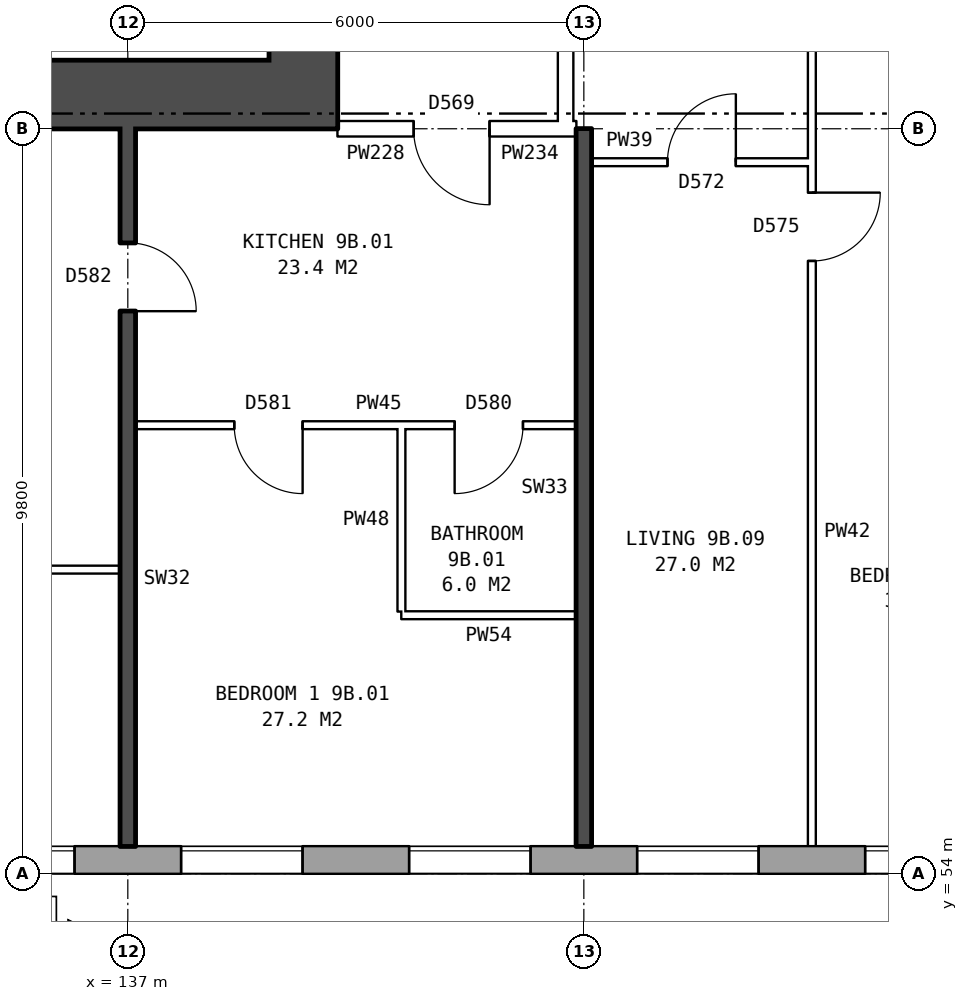
"""IFC4 building model, lengths in metres.
Left out: names, types, materials, properties, quantities, classifications, styles, units other than length and angle.
Written with IfcOpenShell. Run it as: python <this file> out.ifc"""

import sys

from ifc_helpers import new_model, si_unit, direction, frame, frame_2d, origin, place, context, subcontext, project, spatial, rectangle, extrude, element, fill, save


model = new_model("IFC4")
c1 = context("Model", 3, precision=1e-05, world=origin(), true_north=direction((0.0, 1.0)))
c2 = subcontext(c1, "Body", "Model", "MODEL_VIEW")
j1 = project(units=[si_unit("LENGTHUNIT", "METRE"), si_unit("PLANEANGLEUNIT", "RADIAN")], contexts=[c1])
p1 = place(None, origin())
s1 = spatial("IfcSite", under=j1, at=p1, CompositionType="ELEMENT")
p2 = place(p1, origin())
s2 = spatial("IfcBuilding", under=s1, at=p2, CompositionType="ELEMENT")
p3 = place(p2, frame((0.0, 0.0, 35.0)))
s3 = spatial("IfcBuildingStorey", under=s2, at=p3, CompositionType="ELEMENT", Elevation=35.0)
p4 = place(p3, frame((134.075, 54.18, 0.0), z_axis=(0.0, 0.0, 1.0), x_axis=(1.0, 0.0, 0.0)))
e1 = element("IfcWall", 1, at=p4, inside=s3, PredefinedType="STANDARD", context=c2, shape_type="SweptSolid", body=[
    extrude(rectangle(XDim=40.601, YDim=0.36, at=frame_2d((20.3, 0.0))), origin(), (0.0, 0.0, 1.0), 2.85),
])
p5 = place(p4, frame((0.625, 0.0, 0.8)))
e2 = element("IfcOpeningElement", 2, at=p5, cuts=e1, PredefinedType="OPENING", context=c2, shape_type="SweptSolid", body=[
    extrude(rectangle(XDim=1.6, YDim=1.8, at=frame_2d((0.8, 0.9))), frame((0.0, 0.19, 0.0), z_axis=(0.0, -1.0, 0.0), x_axis=(1.0, 0.0, 0.0)), (0.0, 0.0, 1.0), 0.38),
])
p6 = place(p4, frame((3.625, 0.0, 0.8)))
e3 = element("IfcOpeningElement", 3, at=p6, cuts=e1, PredefinedType="OPENING", context=c2, shape_type="SweptSolid", body=[
    extrude(rectangle(XDim=1.6, YDim=1.8, at=frame_2d((0.8, 0.9))), frame((0.0, 0.19, 0.0), z_axis=(0.0, -1.0, 0.0), x_axis=(1.0, 0.0, 0.0)), (0.0, 0.0, 1.0), 0.38),
])
p7 = place(p4, frame((6.625, 0.0, 0.8)))
e4 = element("IfcOpeningElement", 4, at=p7, cuts=e1, PredefinedType="OPENING", context=c2, shape_type="SweptSolid", body=[
    extrude(rectangle(XDim=1.6, YDim=1.8, at=frame_2d((0.8, 0.9))), frame((0.0, 0.19, 0.0), z_axis=(0.0, -1.0, 0.0), x_axis=(1.0, 0.0, 0.0)), (0.0, 0.0, 1.0), 0.38),
])
p8 = place(p4, frame((9.625, 0.0, 0.8)))
e5 = element("IfcOpeningElement", 5, at=p8, cuts=e1, PredefinedType="OPENING", context=c2, shape_type="SweptSolid", body=[
    extrude(rectangle(XDim=1.6, YDim=1.8, at=frame_2d((0.8, 0.9))), frame((0.0, 0.19, 0.0), z_axis=(0.0, -1.0, 0.0), x_axis=(1.0, 0.0, 0.0)), (0.0, 0.0, 1.0), 0.38),
])
p9 = place(p4, frame((12.625, 0.0, 0.8)))
e6 = element("IfcOpeningElement", 6, at=p9, cuts=e1, PredefinedType="OPENING", context=c2, shape_type="SweptSolid", body=[
    extrude(rectangle(XDim=1.6, YDim=1.8, at=frame_2d((0.8, 0.9))), frame((0.0, 0.19, 0.0), z_axis=(0.0, -1.0, 0.0), x_axis=(1.0, 0.0, 0.0)), (0.0, 0.0, 1.0), 0.38),
])
p10 = place(p4, frame((15.625, 0.0, 0.8)))
e7 = element("IfcOpeningElement", 7, at=p10, cuts=e1, PredefinedType="OPENING", context=c2, shape_type="SweptSolid", body=[
    extrude(rectangle(XDim=1.6, YDim=1.8, at=frame_2d((0.8, 0.9))), frame((0.0, 0.19, 0.0), z_axis=(0.0, -1.0, 0.0), x_axis=(1.0, 0.0, 0.0)), (0.0, 0.0, 1.0), 0.38),
])
p11 = place(p4, frame((18.875, 0.0, 0.15)))
e8 = element("IfcOpeningElement", 8, at=p11, cuts=e1, PredefinedType="OPENING", context=c2, shape_type="SweptSolid", body=[
    extrude(rectangle(XDim=0.8, YDim=0.9, at=frame_2d((0.4, 0.45))), frame((0.0, 0.19, 0.0), z_axis=(0.0, -1.0, 0.0), x_axis=(1.0, 0.0, 0.0)), (0.0, 0.0, 1.0), 0.38),
])
p12 = place(p4, frame((22.175, 0.0, 1.7)))
e9 = element("IfcOpeningElement", 9, at=p12, cuts=e1, PredefinedType="OPENING", context=c2, shape_type="SweptSolid", body=[
    extrude(rectangle(XDim=0.8, YDim=0.9, at=frame_2d((0.4, 0.45))), frame((0.0, 0.19, 0.0), z_axis=(0.0, -1.0, 0.0), x_axis=(1.0, 0.0, 0.0)), (0.0, 0.0, 1.0), 0.38),
])
p13 = place(p4, frame((24.625, 0.0, 0.8)))
e10 = element("IfcOpeningElement", 10, at=p13, cuts=e1, PredefinedType="OPENING", context=c2, shape_type="SweptSolid", body=[
    extrude(rectangle(XDim=1.6, YDim=1.8, at=frame_2d((0.8, 0.9))), frame((0.0, 0.19, 0.0), z_axis=(0.0, -1.0, 0.0), x_axis=(1.0, 0.0, 0.0)), (0.0, 0.0, 1.0), 0.38),
])
p14 = place(p4, frame((27.625, 0.0, 0.8)))
e11 = element("IfcOpeningElement", 11, at=p14, cuts=e1, PredefinedType="OPENING", context=c2, shape_type="SweptSolid", body=[
    extrude(rectangle(XDim=1.6, YDim=1.8, at=frame_2d((0.8, 0.9))), frame((0.0, 0.19, 0.0), z_axis=(0.0, -1.0, 0.0), x_axis=(1.0, 0.0, 0.0)), (0.0, 0.0, 1.0), 0.38),
])
p15 = place(p4, frame((30.625, 0.0, 0.8)))
e12 = element("IfcOpeningElement", 12, at=p15, cuts=e1, PredefinedType="OPENING", context=c2, shape_type="SweptSolid", body=[
    extrude(rectangle(XDim=1.6, YDim=1.8, at=frame_2d((0.8, 0.9))), frame((0.0, 0.19, 0.0), z_axis=(0.0, -1.0, 0.0), x_axis=(1.0, 0.0, 0.0)), (0.0, 0.0, 1.0), 0.38),
])
p16 = place(p4, frame((33.625, 0.0, 0.8)))
e13 = element("IfcOpeningElement", 13, at=p16, cuts=e1, PredefinedType="OPENING", context=c2, shape_type="SweptSolid", body=[
    extrude(rectangle(XDim=1.6, YDim=1.8, at=frame_2d((0.8, 0.9))), frame((0.0, 0.19, 0.0), z_axis=(0.0, -1.0, 0.0), x_axis=(1.0, 0.0, 0.0)), (0.0, 0.0, 1.0), 0.38),
])
p17 = place(p4, frame((36.625, 0.0, 0.8)))
e14 = element("IfcOpeningElement", 14, at=p17, cuts=e1, PredefinedType="OPENING", context=c2, shape_type="SweptSolid", body=[
    extrude(rectangle(XDim=1.6, YDim=1.8, at=frame_2d((0.8, 0.9))), frame((0.0, 0.19, 0.0), z_axis=(0.0, -1.0, 0.0), x_axis=(1.0, 0.0, 0.0)), (0.0, 0.0, 1.0), 0.38),
])
p18 = place(p4, frame((19.975, 0.0, 0.15)))
e15 = element("IfcOpeningElement", 15, at=p18, cuts=e1, PredefinedType="OPENING", context=c2, shape_type="SweptSolid", body=[
    extrude(rectangle(XDim=0.6, YDim=1.8, at=frame_2d((0.3, 0.9))), frame((0.0, 0.19, 0.0), z_axis=(0.0, -1.0, 0.0), x_axis=(1.0, 0.0, 0.0)), (0.0, 0.0, 1.0), 0.38),
])
p19 = place(p4, frame((23.325, 0.0, 0.8)))
e16 = element("IfcOpeningElement", 16, at=p19, cuts=e1, PredefinedType="OPENING", context=c2, shape_type="SweptSolid", body=[
    extrude(rectangle(XDim=1.0, YDim=1.8, at=frame_2d((0.5, 0.9))), frame((0.0, 0.19, 0.0), z_axis=(0.0, -1.0, 0.0), x_axis=(1.0, 0.0, 0.0)), (0.0, 0.0, 1.0), 0.38),
])
p20 = place(p3, frame((139.31, 64.7, 0.0), z_axis=(0.0, 0.0, 1.0), x_axis=(0.0, 1.0, 0.0)))
e17 = element("IfcWall", 17, at=p20, inside=s3, PredefinedType="SHEAR", context=c2, shape_type="SweptSolid", body=[
    extrude(rectangle(XDim=10.6, YDim=0.9, at=frame_2d((5.3, 0.0))), origin(), (0.0, 0.0, 1.0), 2.85),
])
p21 = place(p20, frame((0.425, 0.0, 0.0)))
e18 = element("IfcOpeningElement", 18, at=p21, cuts=e17, PredefinedType="OPENING", context=c2, shape_type="SweptSolid", body=[
    extrude(rectangle(XDim=1.1, YDim=2.1, at=frame_2d((0.55, 1.05))), frame((0.0, 0.46, 0.0), z_axis=(0.0, -1.0, 0.0), x_axis=(1.0, 0.0, 0.0)), (0.0, 0.0, 1.0), 0.92),
])
p22 = place(p20, frame((9.0, 0.0, 0.0)))
e19 = element("IfcOpeningElement", 19, at=p22, cuts=e17, PredefinedType="OPENING", context=c2, shape_type="SweptSolid", body=[
    extrude(rectangle(XDim=1.1, YDim=2.1, at=frame_2d((0.55, 1.05))), frame((0.0, 0.46, 0.0), z_axis=(0.0, -1.0, 0.0), x_axis=(1.0, 0.0, 0.0)), (0.0, 0.0, 1.0), 0.92),
])
p23 = place(p20, frame((7.225, 0.0, 0.0)))
e20 = element("IfcOpeningElement", 20, at=p23, cuts=e17, PredefinedType="OPENING", context=c2, shape_type="SweptSolid", body=[
    extrude(rectangle(XDim=0.85, YDim=2.1, at=frame_2d((0.425, 1.05))), frame((0.0, 0.46, 0.0), z_axis=(0.0, -1.0, 0.0), x_axis=(1.0, 0.0, 0.0)), (0.0, 0.0, 1.0), 0.92),
])
p24 = place(p3, frame((139.76, 64.25, 0.0), z_axis=(0.0, 0.0, 1.0), x_axis=(-1.0, 0.0, 0.0)))
e21 = element("IfcWall", 21, at=p24, inside=s3, PredefinedType="SHEAR", context=c2, shape_type="SweptSolid", body=[
    extrude(rectangle(XDim=8.4, YDim=0.9, at=frame_2d((4.2, 0.0))), origin(), (0.0, 0.0, 1.0), 2.85),
])
p25 = place(p3, frame((142.76, 63.9, 0.0), z_axis=(0.0, 0.0, 1.0), x_axis=(0.0, 1.0, 0.0)))
e22 = element("IfcWall", 22, at=p25, inside=s3, PredefinedType="PARTITIONING", context=c2, shape_type="SweptSolid", body=[
    extrude(rectangle(XDim=12.2, YDim=0.2, at=frame_2d((6.1, 0.0))), origin(), (0.0, 0.0, 1.0), 2.85),
])
p26 = place(p25, frame((5.1, 0.0, 0.0)))
e23 = element("IfcOpeningElement", 23, at=p26, cuts=e22, PredefinedType="OPENING", context=c2, shape_type="SweptSolid", body=[
    extrude(rectangle(XDim=2.0, YDim=2.1, at=frame_2d((1.0, 1.05))), frame((0.0, 0.11, 0.0), z_axis=(0.0, -1.0, 0.0), x_axis=(1.0, 0.0, 0.0)), (0.0, 0.0, 1.0), 0.22),
])
p27 = place(p3, frame((140.6, 57.4, 0.0), z_axis=(0.0, 0.0, 1.0), x_axis=(1.0, 0.0, 0.0)))
e24 = element("IfcWall", 24, at=p27, inside=s3, PredefinedType="PARTITIONING", context=c2, shape_type="SweptSolid", body=[
    extrude(rectangle(XDim=2.3, YDim=0.1, at=frame_2d((1.15, 0.0))), origin(), (0.0, 0.0, 1.0), 2.85),
])
p28 = place(p3, frame((131.36, 58.0, 0.0), z_axis=(0.0, 0.0, 1.0), x_axis=(1.0, 0.0, 0.0)))
e25 = element("IfcWall", 25, at=p28, inside=s3, PredefinedType="PARTITIONING", context=c2, shape_type="SweptSolid", body=[
    extrude(rectangle(XDim=5.54, YDim=0.1, at=frame_2d((2.77, 0.0))), origin(), (0.0, 0.0, 1.0), 2.85),
])
p29 = place(p28, frame((2.32, 0.0, 0.0)))
e26 = element("IfcOpeningElement", 26, at=p29, cuts=e25, PredefinedType="OPENING", context=c2, shape_type="SweptSolid", body=[
    extrude(rectangle(XDim=0.9, YDim=2.1, at=frame_2d((0.45, 1.05))), frame((0.0, 0.06, 0.0), z_axis=(0.0, -1.0, 0.0), x_axis=(1.0, 0.0, 0.0)), (0.0, 0.0, 1.0), 0.12),
])
p30 = place(p3, frame((137.1, 59.9, 0.0), z_axis=(0.0, 0.0, 1.0), x_axis=(1.0, 0.0, 0.0)))
e27 = element("IfcWall", 27, at=p30, inside=s3, PredefinedType="PARTITIONING", context=c2, shape_type="SweptSolid", body=[
    extrude(rectangle(XDim=5.8, YDim=0.1, at=frame_2d((2.9, 0.0))), origin(), (0.0, 0.0, 1.0), 2.85),
])
p31 = place(p30, frame((1.3, 0.0, 0.0)))
e28 = element("IfcOpeningElement", 28, at=p31, cuts=e27, PredefinedType="OPENING", context=c2, shape_type="SweptSolid", body=[
    extrude(rectangle(XDim=0.9, YDim=2.1, at=frame_2d((0.45, 1.05))), frame((0.0, 0.06, 0.0), z_axis=(0.0, -1.0, 0.0), x_axis=(1.0, 0.0, 0.0)), (0.0, 0.0, 1.0), 0.12),
])
p32 = place(p30, frame((4.2, 0.0, 0.0)))
e29 = element("IfcOpeningElement", 29, at=p32, cuts=e27, PredefinedType="OPENING", context=c2, shape_type="SweptSolid", body=[
    extrude(rectangle(XDim=0.9, YDim=2.1, at=frame_2d((0.45, 1.05))), frame((0.0, 0.06, 0.0), z_axis=(0.0, -1.0, 0.0), x_axis=(1.0, 0.0, 0.0)), (0.0, 0.0, 1.0), 0.12),
])
p33 = place(p3, frame((143.1, 63.36, 0.0), z_axis=(0.0, 0.0, 1.0), x_axis=(1.0, 0.0, 0.0)))
e30 = element("IfcWall", 30, at=p33, inside=s3, PredefinedType="PARTITIONING", context=c2, shape_type="SweptSolid", body=[
    extrude(rectangle(XDim=2.9, YDim=0.1, at=frame_2d((1.45, 0.0))), origin(), (0.0, 0.0, 1.0), 2.85),
])
p34 = place(p33, frame((1.0, 0.0, 0.0)))
e31 = element("IfcOpeningElement", 31, at=p34, cuts=e30, PredefinedType="OPENING", context=c2, shape_type="SweptSolid", body=[
    extrude(rectangle(XDim=0.9, YDim=2.1, at=frame_2d((0.45, 1.05))), frame((0.0, 0.06, 0.0), z_axis=(0.0, -1.0, 0.0), x_axis=(1.0, 0.0, 0.0)), (0.0, 0.0, 1.0), 0.12),
])
p35 = place(p3, frame((139.76, 63.8, 0.0), z_axis=(0.0, 0.0, 1.0), x_axis=(1.0, 0.0, 0.0)))
e32 = element("IfcWall", 32, at=p35, inside=s3, PredefinedType="PARTITIONING", context=c2, shape_type="SweptSolid", body=[
    extrude(rectangle(XDim=3.0, YDim=0.2, at=frame_2d((1.5, 0.0))), origin(), (0.0, 0.0, 1.0), 2.85),
])
p36 = place(p35, frame((1.0, 0.0, 0.0)))
e33 = element("IfcOpeningElement", 33, at=p36, cuts=e32, PredefinedType="OPENING", context=c2, shape_type="SweptSolid", body=[
    extrude(rectangle(XDim=1.0, YDim=2.1, at=frame_2d((0.5, 1.05))), frame((0.0, 0.11, 0.0), z_axis=(0.0, -1.0, 0.0), x_axis=(1.0, 0.0, 0.0)), (0.0, 0.0, 1.0), 0.22),
])
p37 = place(p3, frame((142.76, 63.8, 0.0), z_axis=(0.0, 0.0, 1.0), x_axis=(1.0, 0.0, 0.0)))
e34 = element("IfcWall", 34, at=p37, inside=s3, PredefinedType="PARTITIONING", context=c2, shape_type="SweptSolid", body=[
    extrude(rectangle(XDim=0.14, YDim=0.2, at=frame_2d((0.07, 0.0))), origin(), (0.0, 0.0, 1.0), 2.85),
])
p38 = place(p3, frame((137.0, 54.36, 0.0), z_axis=(0.0, 0.0, 1.0), x_axis=(0.0, 1.0, 0.0)))
e35 = element("IfcWall", 35, at=p38, inside=s3, PredefinedType="SOLIDWALL", context=c2, shape_type="SweptSolid", body=[
    extrude(rectangle(XDim=9.44, YDim=0.2, at=frame_2d((4.72, 0.0))), origin(), (0.0, 0.0, 1.0), 2.85),
])
p39 = place(p38, frame((7.04, 0.0, 0.0)))
e36 = element("IfcOpeningElement", 36, at=p39, cuts=e35, PredefinedType="OPENING", context=c2, shape_type="SweptSolid", body=[
    extrude(rectangle(XDim=0.9, YDim=2.1, at=frame_2d((0.45, 1.05))), frame((0.0, 0.11, 0.0), z_axis=(0.0, -1.0, 0.0), x_axis=(1.0, 0.0, 0.0)), (0.0, 0.0, 1.0), 0.22),
])
p40 = place(p3, frame((140.6, 57.45, 0.0), z_axis=(0.0, 0.0, 1.0), x_axis=(0.0, 1.0, 0.0)))
e37 = element("IfcWall", 37, at=p40, inside=s3, PredefinedType="PARTITIONING", context=c2, shape_type="SweptSolid", body=[
    extrude(rectangle(XDim=2.4, YDim=0.1, at=frame_2d((1.2, 0.0))), origin(), (0.0, 0.0, 1.0), 2.85),
])
p41 = place(p3, frame((143.0, 54.36, 0.0), z_axis=(0.0, 0.0, 1.0), x_axis=(0.0, 1.0, 0.0)))
e38 = element("IfcWall", 38, at=p41, inside=s3, PredefinedType="SOLIDWALL", context=c2, shape_type="SweptSolid", body=[
    extrude(rectangle(XDim=9.44, YDim=0.2, at=frame_2d((4.72, 0.0))), origin(), (0.0, 0.0, 1.0), 2.85),
])
p42 = place(p3, frame((146.0, 54.36, 0.0), z_axis=(0.0, 0.0, 1.0), x_axis=(0.0, 1.0, 0.0)))
e39 = element("IfcWall", 39, at=p42, inside=s3, PredefinedType="PARTITIONING", context=c2, shape_type="SweptSolid", body=[
    extrude(rectangle(XDim=14.34, YDim=0.1, at=frame_2d((7.17, 0.0))), origin(), (0.0, 0.0, 1.0), 2.85),
])
p43 = place(p42, frame((7.7, 0.0, 0.0)))
e40 = element("IfcOpeningElement", 40, at=p43, cuts=e39, PredefinedType="OPENING", context=c2, shape_type="SweptSolid", body=[
    extrude(rectangle(XDim=0.9, YDim=2.1, at=frame_2d((0.45, 1.05))), frame((0.0, 0.06, 0.0), z_axis=(0.0, -1.0, 0.0), x_axis=(1.0, 0.0, 0.0)), (0.0, 0.0, 1.0), 0.12),
])
p44 = place(p42, frame((13.04, 0.0, 0.0)))
e41 = element("IfcOpeningElement", 41, at=p44, cuts=e39, PredefinedType="OPENING", context=c2, shape_type="SweptSolid", body=[
    extrude(rectangle(XDim=0.9, YDim=2.1, at=frame_2d((0.45, 1.05))), frame((0.0, 0.06, 0.0), z_axis=(0.0, -1.0, 0.0), x_axis=(1.0, 0.0, 0.0)), (0.0, 0.0, 1.0), 0.12),
])
p45 = place(p5, origin())
e42 = element("IfcWindow", 42, at=p45, inside=s3, PartitioningType="SINGLE_PANEL", PredefinedType="WINDOW", context=c2, shape_type="SweptSolid", body=[
    extrude(rectangle(XDim=1.6, YDim=1.8, at=frame_2d((0.8, 0.9))), frame((0.0, 0.15, 0.0), z_axis=(0.0, -1.0, 0.0), x_axis=(1.0, 0.0, 0.0)), (0.0, 0.0, 1.0), 0.06),
])
fill(e2, e42)
p46 = place(p6, origin())
e43 = element("IfcWindow", 43, at=p46, inside=s3, PartitioningType="SINGLE_PANEL", PredefinedType="WINDOW", context=c2, shape_type="SweptSolid", body=[
    extrude(rectangle(XDim=1.6, YDim=1.8, at=frame_2d((0.8, 0.9))), frame((0.0, 0.15, 0.0), z_axis=(0.0, -1.0, 0.0), x_axis=(1.0, 0.0, 0.0)), (0.0, 0.0, 1.0), 0.06),
])
fill(e3, e43)
p47 = place(p7, origin())
e44 = element("IfcWindow", 44, at=p47, inside=s3, PartitioningType="SINGLE_PANEL", PredefinedType="WINDOW", context=c2, shape_type="SweptSolid", body=[
    extrude(rectangle(XDim=1.6, YDim=1.8, at=frame_2d((0.8, 0.9))), frame((0.0, 0.15, 0.0), z_axis=(0.0, -1.0, 0.0), x_axis=(1.0, 0.0, 0.0)), (0.0, 0.0, 1.0), 0.06),
])
fill(e4, e44)
p48 = place(p8, origin())
e45 = element("IfcWindow", 45, at=p48, inside=s3, PartitioningType="SINGLE_PANEL", PredefinedType="WINDOW", context=c2, shape_type="SweptSolid", body=[
    extrude(rectangle(XDim=1.6, YDim=1.8, at=frame_2d((0.8, 0.9))), frame((0.0, 0.15, 0.0), z_axis=(0.0, -1.0, 0.0), x_axis=(1.0, 0.0, 0.0)), (0.0, 0.0, 1.0), 0.06),
])
fill(e5, e45)
p49 = place(p9, origin())
e46 = element("IfcWindow", 46, at=p49, inside=s3, PartitioningType="SINGLE_PANEL", PredefinedType="WINDOW", context=c2, shape_type="SweptSolid", body=[
    extrude(rectangle(XDim=1.6, YDim=1.8, at=frame_2d((0.8, 0.9))), frame((0.0, 0.15, 0.0), z_axis=(0.0, -1.0, 0.0), x_axis=(1.0, 0.0, 0.0)), (0.0, 0.0, 1.0), 0.06),
])
fill(e6, e46)
p50 = place(p31, frame((0.9, 0.0, 0.0), z_axis=(0.0, 0.0, 1.0), x_axis=(-1.0, 0.0, 0.0)))
e47 = element("IfcDoor", 47, at=p50, inside=s3, OperationType="SINGLE_SWING_LEFT", PredefinedType="DOOR", context=c2, shape_type="SweptSolid", body=[
    extrude(rectangle(XDim=0.9, YDim=2.1, at=frame_2d((0.45, 1.05))), frame((0.0, 0.025, 0.0), z_axis=(0.0, -1.0, 0.0), x_axis=(1.0, 0.0, 0.0)), (0.0, 0.0, 1.0), 0.05),
])
fill(e28, e47)
p51 = place(p36, frame((1.0, 0.0, 0.0), z_axis=(0.0, 0.0, 1.0), x_axis=(-1.0, 0.0, 0.0)))
e48 = element("IfcDoor", 48, at=p51, inside=s3, OperationType="SINGLE_SWING_LEFT", PredefinedType="DOOR", context=c2, shape_type="SweptSolid", body=[
    extrude(rectangle(XDim=1.0, YDim=2.1, at=frame_2d((0.5, 1.05))), frame((0.0, 0.025, 0.0), z_axis=(0.0, -1.0, 0.0), x_axis=(1.0, 0.0, 0.0)), (0.0, 0.0, 1.0), 0.05),
])
fill(e33, e48)
p52 = place(p39, frame((0.9, 0.0, 0.0), z_axis=(0.0, 0.0, 1.0), x_axis=(-1.0, 0.0, 0.0)))
e49 = element("IfcDoor", 49, at=p52, inside=s3, OperationType="SINGLE_SWING_RIGHT", PredefinedType="DOOR", context=c2, shape_type="SweptSolid", body=[
    extrude(rectangle(XDim=0.9, YDim=2.1, at=frame_2d((0.45, 1.05))), frame((0.0, 0.025, 0.0), z_axis=(0.0, -1.0, 0.0), x_axis=(1.0, 0.0, 0.0)), (0.0, 0.0, 1.0), 0.05),
])
fill(e36, e49)
p53 = place(p32, frame((0.9, 0.0, 0.0), z_axis=(0.0, 0.0, 1.0), x_axis=(-1.0, 0.0, 0.0)))
e50 = element("IfcDoor", 50, at=p53, inside=s3, OperationType="SINGLE_SWING_RIGHT", PredefinedType="DOOR", context=c2, shape_type="SweptSolid", body=[
    extrude(rectangle(XDim=0.9, YDim=2.1, at=frame_2d((0.45, 1.05))), frame((0.0, 0.025, 0.0), z_axis=(0.0, -1.0, 0.0), x_axis=(1.0, 0.0, 0.0)), (0.0, 0.0, 1.0), 0.05),
])
fill(e29, e50)
p54 = place(p43, frame((0.9, 0.0, 0.0), z_axis=(0.0, 0.0, 1.0), x_axis=(-1.0, 0.0, 0.0)))
e51 = element("IfcDoor", 51, at=p54, inside=s3, OperationType="SINGLE_SWING_LEFT", PredefinedType="DOOR", context=c2, shape_type="SweptSolid", body=[
    extrude(rectangle(XDim=0.9, YDim=2.1, at=frame_2d((0.45, 1.05))), frame((0.0, 0.025, 0.0), z_axis=(0.0, -1.0, 0.0), x_axis=(1.0, 0.0, 0.0)), (0.0, 0.0, 1.0), 0.05),
])
fill(e40, e51)
p55 = place(p34, origin())
e52 = element("IfcDoor", 52, at=p55, inside=s3, OperationType="SINGLE_SWING_RIGHT", PredefinedType="DOOR", context=c2, shape_type="SweptSolid", body=[
    extrude(rectangle(XDim=0.9, YDim=2.1, at=frame_2d((0.45, 1.05))), frame((0.0, 0.025, 0.0), z_axis=(0.0, -1.0, 0.0), x_axis=(1.0, 0.0, 0.0)), (0.0, 0.0, 1.0), 0.05),
])
fill(e31, e52)
save(model, sys.argv[1])
